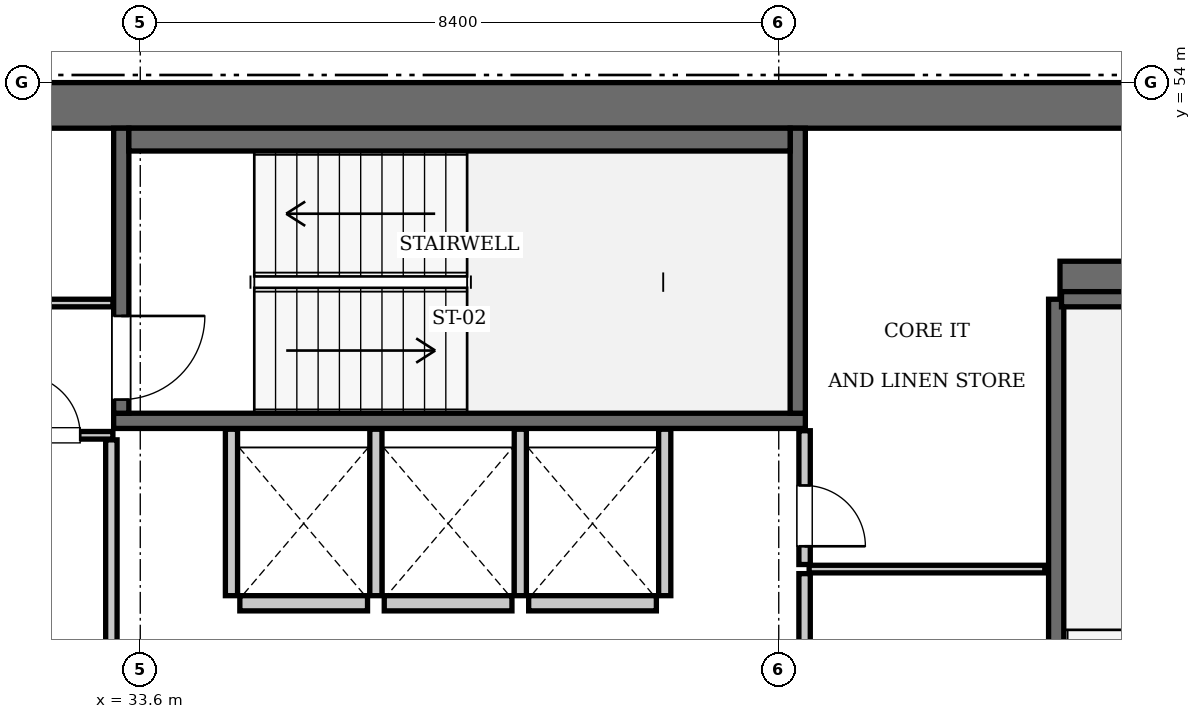
"""IFC4 building model, lengths in metres.
Left out: names, types, materials, properties, quantities, classifications, styles, units other than length and angle.
Written with IfcOpenShell. Run it as: python <this file> out.ifc"""

import sys

from ifc_helpers import new_model, si_unit, direction, frame, frame_2d, origin, place, context, subcontext, project, spatial, rectangle, extrude, element, fill, save


model = new_model("IFC4")
c1 = context("Model", 3, precision=1e-05, world=origin(), true_north=direction((0.0, 1.0)))
c2 = subcontext(c1, "Body", "Model", "MODEL_VIEW")
j1 = project(units=[si_unit("LENGTHUNIT", "METRE"), si_unit("PLANEANGLEUNIT", "RADIAN")], contexts=[c1])
p1 = place(None, origin())
s1 = spatial("IfcSite", under=j1, at=p1, CompositionType="ELEMENT")
p2 = place(p1, origin())
s2 = spatial("IfcBuilding", under=s1, at=p2, CompositionType="ELEMENT")
p3 = place(p2, frame((0.0, 0.0, 277.9)))
s3 = spatial("IfcBuildingStorey", under=s2, at=p3, CompositionType="ELEMENT", Elevation=277.9)
p4 = place(p3, frame((25.2, 53.7, 0.0), z_axis=(0.0, 0.0, 1.0), x_axis=(1.0, 0.0, 0.0)))
e1 = element("IfcWall", 1, at=p4, inside=s3, PredefinedType="SHEAR", context=c2, shape_type="SweptSolid", body=[
    extrude(rectangle(XDim=25.2, YDim=0.6, at=frame_2d((12.6, 0.0))), origin(), (0.0, 0.0, 1.0), 3.85),
])
p5 = place(p3, frame((45.7, 51.4, 0.0), z_axis=(0.0, 0.0, 1.0), x_axis=(1.0, 0.0, 0.0)))
e2 = element("IfcWall", 2, at=p5, inside=s3, PredefinedType="SHEAR", context=c2, shape_type="SweptSolid", body=[
    extrude(rectangle(XDim=4.1, YDim=0.5, at=frame_2d((2.05, 0.0))), origin(), (0.0, 0.0, 1.0), 3.85),
])
p6 = place(p3, frame((33.25, 49.55, 0.0), z_axis=(0.0, 0.0, 1.0), x_axis=(1.0, 0.0, 0.0)))
e3 = element("IfcWall", 3, at=p6, inside=s3, PredefinedType="SOLIDWALL", context=c2, shape_type="SweptSolid", body=[
    extrude(rectangle(XDim=9.1, YDim=0.2, at=frame_2d((4.55, 0.0))), origin(), (0.0, 0.0, 1.0), 3.61),
])
p7 = place(p3, frame((42.25, 49.65, 0.0), z_axis=(0.0, 0.0, 1.0), x_axis=(0.0, 1.0, 0.0)))
e4 = element("IfcWall", 4, at=p7, inside=s3, PredefinedType="SOLIDWALL", context=c2, shape_type="SweptSolid", body=[
    extrude(rectangle(XDim=3.75, YDim=0.2, at=frame_2d((1.875, 0.0))), origin(), (0.0, 0.0, 1.0), 3.61),
])
p8 = place(p3, frame((33.35, 49.65, 0.0), z_axis=(0.0, 0.0, 1.0), x_axis=(0.0, 1.0, 0.0)))
e5 = element("IfcWall", 5, at=p8, inside=s3, PredefinedType="SOLIDWALL", context=c2, shape_type="SweptSolid", body=[
    extrude(rectangle(XDim=3.75, YDim=0.2, at=frame_2d((1.875, 0.0))), origin(), (0.0, 0.0, 1.0), 3.61),
])
p9 = place(p8, frame((0.18, 0.0, 0.0)))
e6 = element("IfcOpeningElement", 6, at=p9, cuts=e5, PredefinedType="OPENING", context=c2, shape_type="SweptSolid", body=[
    extrude(rectangle(XDim=1.1, YDim=2.15, at=frame_2d((0.55, 1.075))), frame((0.0, 0.11, 0.0), z_axis=(0.0, -1.0, 0.0), x_axis=(1.0, 0.0, 0.0)), (0.0, 0.0, 1.0), 0.22),
])
p10 = place(p3, frame((33.45, 53.25, 0.0), z_axis=(0.0, 0.0, 1.0), x_axis=(1.0, 0.0, 0.0)))
e7 = element("IfcWall", 7, at=p10, inside=s3, PredefinedType="SOLIDWALL", context=c2, shape_type="SweptSolid", body=[
    extrude(rectangle(XDim=8.7, YDim=0.3, at=frame_2d((4.35, 0.0))), origin(), (0.0, 0.0, 1.0), 3.61),
])
p11 = place(p3, frame((45.65, 42.0, 0.0), z_axis=(0.0, 0.0, 1.0), x_axis=(0.0, 1.0, 0.0)))
e8 = element("IfcWall", 8, at=p11, inside=s3, PredefinedType="SOLIDWALL", context=c2, shape_type="SweptSolid", body=[
    extrude(rectangle(XDim=9.15, YDim=0.2, at=frame_2d((4.575, 0.0))), origin(), (0.0, 0.0, 1.0), 3.61),
])
p12 = place(p3, frame((45.72, 51.15, 0.0), z_axis=(0.0, 0.0, 1.0), x_axis=(1.0, 0.0, 0.0)))
e9 = element("IfcWall", 9, at=p12, inside=s3, PredefinedType="SOLIDWALL", context=c2, shape_type="SweptSolid", body=[
    extrude(rectangle(XDim=3.5, YDim=0.2, at=frame_2d((1.75, 0.0))), origin(), (0.0, 0.0, 1.0), 3.61),
])
p13 = place(p3, frame((34.91, 47.15, 0.0), z_axis=(0.0, 0.0, 1.0), x_axis=(1.0, 0.0, 0.0)))
e10 = element("IfcWall", 10, at=p13, inside=s3, PredefinedType="SOLIDWALL", context=c2, shape_type="SweptSolid", body=[
    extrude(rectangle(XDim=1.68, YDim=0.2, at=frame_2d((0.84, 0.0))), origin(), (0.0, 0.0, 1.0), 3.61),
])
for number, where, z_axis, x_axis in (
    (11, (36.81, 47.15, 0.0), (0.0, 0.0, 1.0), (1.0, 0.0, 0.0)),
    (12, (38.71, 47.15, 0.0), (0.0, 0.0, 1.0), (1.0, 0.0, 0.0)),
):
    element("IfcWall", number, at=place(p3, frame(where, z_axis=z_axis, x_axis=x_axis)), inside=s3, PredefinedType="SOLIDWALL", context=c2, shape_type="SweptSolid", body=[
        extrude(rectangle(XDim=1.68, YDim=0.2, at=frame_2d((0.84, 0.0))), origin(), (0.0, 0.0, 1.0), 3.61),
    ])
for number, where, z_axis, x_axis in (
    (13, (34.8, 47.25, 0.0), (0.0, 0.0, 1.0), (0.0, 1.0, 0.0)),
    (14, (36.7, 47.25, 0.0), (0.0, 0.0, 1.0), (0.0, 1.0, 0.0)),
    (15, (38.6, 47.25, 0.0), (0.0, 0.0, 1.0), (0.0, 1.0, 0.0)),
    (16, (40.5, 47.25, 0.0), (0.0, 0.0, 1.0), (0.0, 1.0, 0.0)),
):
    element("IfcWall", number, at=place(p3, frame(where, z_axis=z_axis, x_axis=x_axis)), inside=s3, PredefinedType="SOLIDWALL", context=c2, shape_type="SweptSolid", body=[
        extrude(rectangle(XDim=2.19, YDim=0.16, at=frame_2d((1.095, 0.0))), origin(), (0.0, 0.0, 1.0), 3.61),
    ])
p14 = place(p3, frame((33.22, 45.14, 0.0), z_axis=(0.0, 0.0, 1.0), x_axis=(0.0, 1.0, 0.0)))
e17 = element("IfcWall", 17, at=p14, inside=s3, PredefinedType="PARTITIONING", context=c2, shape_type="SweptSolid", body=[
    extrude(rectangle(XDim=4.16, YDim=0.15, at=frame_2d((2.08, 0.0))), origin(), (0.0, 0.0, 1.0), 3.61),
])
p15 = place(p3, frame((30.06, 49.36, 0.0), z_axis=(0.0, 0.0, 1.0), x_axis=(1.0, 0.0, 0.0)))
e18 = element("IfcWall", 18, at=p15, inside=s3, PredefinedType="PARTITIONING", context=c2, shape_type="SweptSolid", body=[
    extrude(rectangle(XDim=3.18, YDim=0.1, at=frame_2d((1.59, 0.0))), origin(), (0.0, 0.0, 1.0), 3.61),
])
p16 = place(p15, frame((1.95, 0.0, 0.0)))
e19 = element("IfcOpeningElement", 19, at=p16, cuts=e18, PredefinedType="OPENING", context=c2, shape_type="SweptSolid", body=[
    extrude(rectangle(XDim=0.8, YDim=2.05, at=frame_2d((0.4, 1.025))), frame((0.0, 0.06, 0.0), z_axis=(0.0, -1.0, 0.0), x_axis=(1.0, 0.0, 0.0)), (0.0, 0.0, 1.0), 0.12),
])
p17 = place(p3, frame((31.82, 51.1, 0.0), z_axis=(0.0, 0.0, 1.0), x_axis=(1.0, 0.0, 0.0)))
e20 = element("IfcWall", 20, at=p17, inside=s3, PredefinedType="PARTITIONING", context=c2, shape_type="SweptSolid", body=[
    extrude(rectangle(XDim=1.42, YDim=0.1, at=frame_2d((0.71, 0.0))), origin(), (0.0, 0.0, 1.0), 3.61),
])
p18 = place(p3, frame((42.34, 45.16, 0.0), z_axis=(0.0, 0.0, 1.0), x_axis=(0.0, 1.0, 0.0)))
e21 = element("IfcWall", 21, at=p18, inside=s3, PredefinedType="PARTITIONING", context=c2, shape_type="SweptSolid", body=[
    extrude(rectangle(XDim=2.38, YDim=0.15, at=frame_2d((1.19, 0.0))), origin(), (0.0, 0.0, 1.0), 3.61),
])
p19 = place(p18, frame((0.55, 0.0, 0.0)))
e22 = element("IfcOpeningElement", 22, at=p19, cuts=e21, PredefinedType="OPENING", context=c2, shape_type="SweptSolid", body=[
    extrude(rectangle(XDim=0.8, YDim=2.05, at=frame_2d((0.4, 1.025))), frame((0.0, 0.085, 0.0), z_axis=(0.0, -1.0, 0.0), x_axis=(1.0, 0.0, 0.0)), (0.0, 0.0, 1.0), 0.17),
])
p20 = place(p3, frame((42.34, 47.66, 0.0), z_axis=(0.0, 0.0, 1.0), x_axis=(0.0, 1.0, 0.0)))
e23 = element("IfcWall", 23, at=p20, inside=s3, PredefinedType="PARTITIONING", context=c2, shape_type="SweptSolid", body=[
    extrude(rectangle(XDim=1.76, YDim=0.15, at=frame_2d((0.88, 0.0))), origin(), (0.0, 0.0, 1.0), 3.61),
])
p21 = place(p20, frame((0.24, 0.0, 0.0)))
e24 = element("IfcOpeningElement", 24, at=p21, cuts=e23, PredefinedType="OPENING", context=c2, shape_type="SweptSolid", body=[
    extrude(rectangle(XDim=0.8, YDim=2.05, at=frame_2d((0.4, 1.025))), frame((0.0, 0.085, 0.0), z_axis=(0.0, -1.0, 0.0), x_axis=(1.0, 0.0, 0.0)), (0.0, 0.0, 1.0), 0.17),
])
p22 = place(p3, frame((42.4, 47.6, 0.0), z_axis=(0.0, 0.0, 1.0), x_axis=(1.0, 0.0, 0.0)))
e25 = element("IfcWall", 25, at=p22, inside=s3, PredefinedType="PARTITIONING", context=c2, shape_type="SweptSolid", body=[
    extrude(rectangle(XDim=3.1, YDim=0.1, at=frame_2d((1.55, 0.0))), origin(), (0.0, 0.0, 1.0), 3.61),
])
p23 = place(p9, frame((1.1, 0.0, 0.0), z_axis=(0.0, 0.0, 1.0), x_axis=(-1.0, 0.0, 0.0)))
e26 = element("IfcDoor", 26, at=p23, inside=s3, OperationType="SINGLE_SWING_LEFT", PredefinedType="DOOR", context=c2, shape_type="SweptSolid", body=[
    extrude(rectangle(XDim=1.1, YDim=2.15, at=frame_2d((0.55, 1.075))), frame((0.0, 0.025, 0.0), z_axis=(0.0, -1.0, 0.0), x_axis=(1.0, 0.0, 0.0)), (0.0, 0.0, 1.0), 0.05),
])
fill(e6, e26)
p24 = place(p16, origin())
e27 = element("IfcDoor", 27, at=p24, inside=s3, OperationType="SINGLE_SWING_LEFT", PredefinedType="DOOR", context=c2, shape_type="SweptSolid", body=[
    extrude(rectangle(XDim=0.8, YDim=2.05, at=frame_2d((0.4, 1.025))), frame((0.0, 0.025, 0.0), z_axis=(0.0, -1.0, 0.0), x_axis=(1.0, 0.0, 0.0)), (0.0, 0.0, 1.0), 0.05),
])
fill(e19, e27)
p25 = place(p21, frame((0.8, 0.0, 0.0), z_axis=(0.0, 0.0, 1.0), x_axis=(-1.0, 0.0, 0.0)))
e28 = element("IfcDoor", 28, at=p25, inside=s3, OperationType="SINGLE_SWING_RIGHT", PredefinedType="DOOR", context=c2, shape_type="SweptSolid", body=[
    extrude(rectangle(XDim=0.8, YDim=2.05, at=frame_2d((0.4, 1.025))), frame((0.0, 0.025, 0.0), z_axis=(0.0, -1.0, 0.0), x_axis=(1.0, 0.0, 0.0)), (0.0, 0.0, 1.0), 0.05),
])
fill(e24, e28)
save(model, sys.argv[1])
